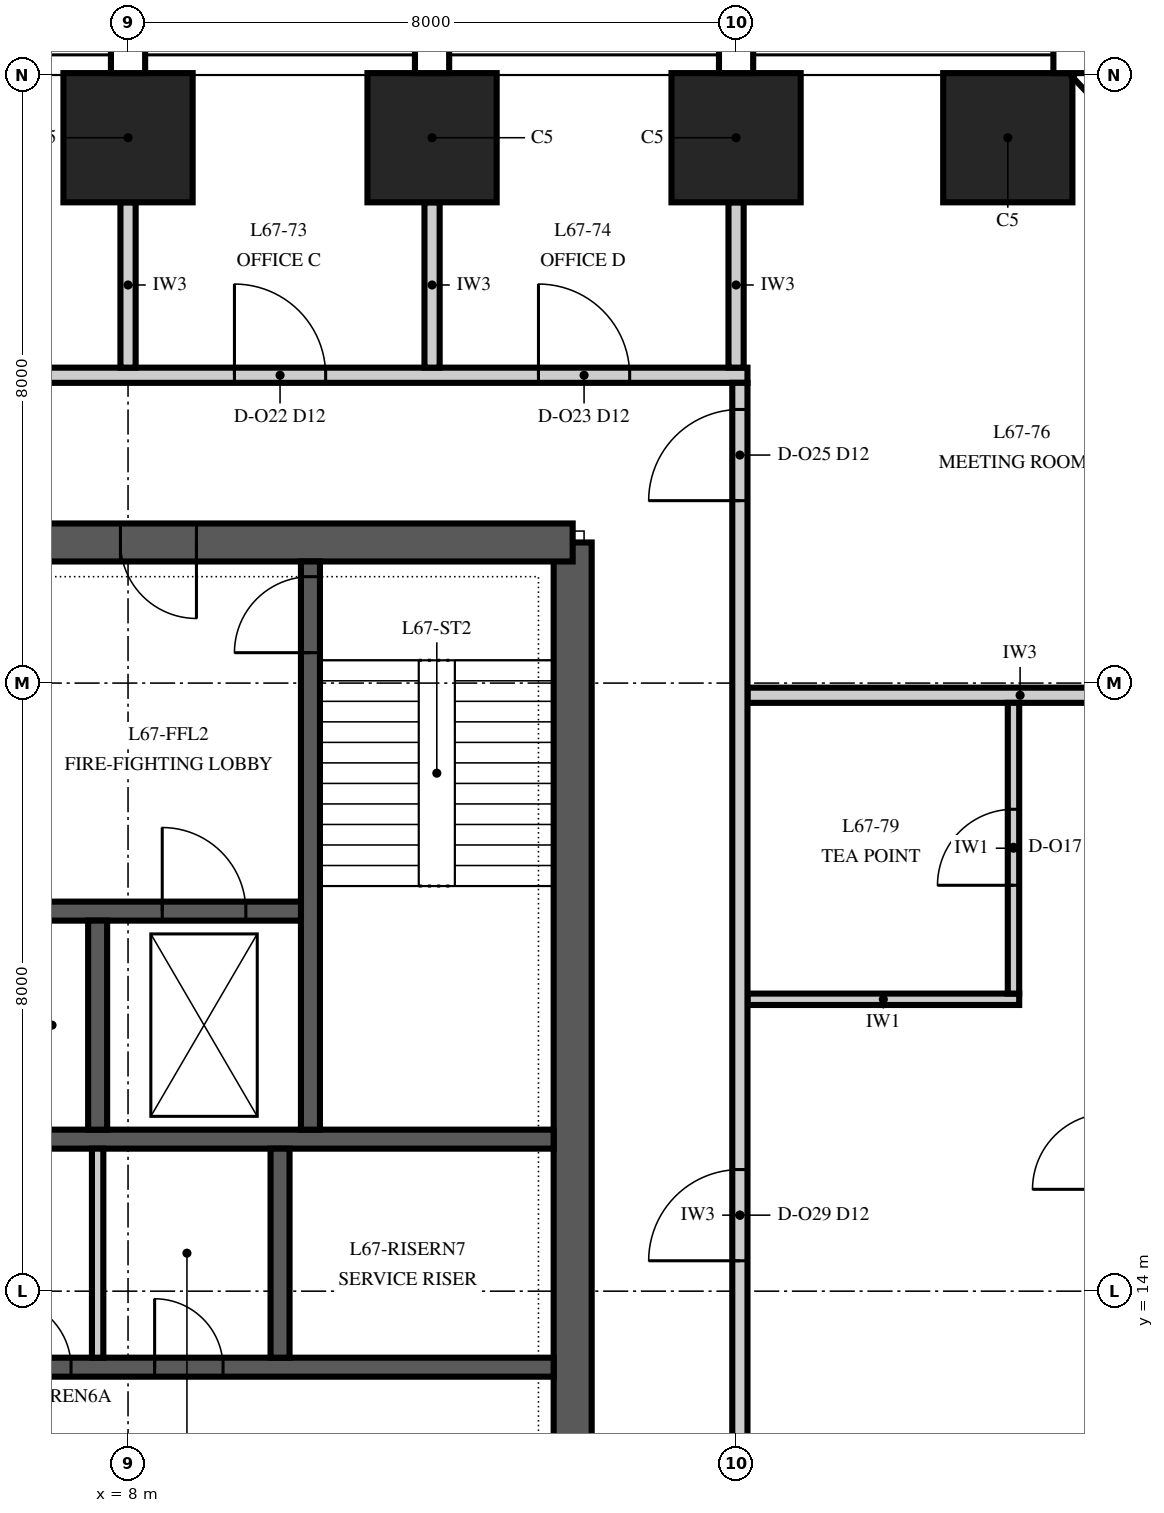
"""IFC4 building model, lengths in metres.
Left out: names, types, materials, properties, quantities, classifications, styles, units other than length and angle.
Written with IfcOpenShell. Run it as: python <this file> out.ifc"""

import sys

from ifc_helpers import new_model, si_unit, direction, frame, frame_2d, origin, origin_2d, place, context, subcontext, project, spatial, polyline, rectangle, outline, extrude, element, fill, save


model = new_model("IFC4")
c1 = context("Model", 3, precision=1e-05, world=origin(), true_north=direction((0.0, 1.0)))
c2 = subcontext(c1, "Body", "Model", "MODEL_VIEW")
j1 = project(units=[si_unit("LENGTHUNIT", "METRE"), si_unit("PLANEANGLEUNIT", "RADIAN")], contexts=[c1])
p1 = place(None, origin())
s1 = spatial("IfcSite", under=j1, at=p1, CompositionType="ELEMENT")
p2 = place(p1, origin())
s2 = spatial("IfcBuilding", under=s1, at=p2, CompositionType="ELEMENT")
p3 = place(p2, frame((0.0, 0.0, 288.0)))
s3 = spatial("IfcBuildingStorey", under=s2, at=p3, CompositionType="ELEMENT", Elevation=288.0)
for number, where, z_axis, x_axis in (
    (1, (19.575, 29.175, 0.0), (0.0, 0.0, 1.0), (-1.0, 0.0, 0.0)),
    (2, (16.0, 29.175, 0.0), (0.0, 0.0, 1.0), (-1.0, 0.0, 0.0)),
    (3, (12.0, 29.175, 0.0), (0.0, 0.0, 1.0), (-1.0, 0.0, 0.0)),
    (4, (8.0, 29.175, 0.0), (0.0, 0.0, 1.0), (-1.0, 0.0, 0.0)),
):
    element("IfcColumn", number, at=place(p3, frame(where, z_axis=z_axis, x_axis=x_axis)), inside=s3, PredefinedType="COLUMN", context=c2, shape_type="SweptSolid", body=[
        extrude(rectangle(XDim=1.7, YDim=1.7, at=origin_2d()), origin(), (0.0, 0.0, 1.0), 4.0),
    ])
p4 = place(p3, frame((13.85, 6.15, 0.0), z_axis=(0.0, 0.0, 1.0), x_axis=(0.0, 1.0, 0.0)))
e5 = element("IfcWall", 5, at=p4, inside=s3, PredefinedType="SHEAR", context=c2, shape_type="SweptSolid", body=[
    extrude(outline(polyline([(0.0, -0.25), (17.7, -0.25), (17.7, 0.0), (17.45, 0.0), (17.45, 0.25), (0.25, 0.25), (0.25, 0.0), (0.0, 0.0), (0.0, -0.25)])), origin(), (0.0, 0.0, 1.0), 4.0),
])
p5 = place(p4, frame((4.15, 0.0, 0.0)))
e6 = element("IfcOpeningElement", 6, at=p5, cuts=e5, PredefinedType="OPENING", context=c2, shape_type="SweptSolid", body=[
    extrude(rectangle(XDim=1.8, YDim=2.4, at=frame_2d((0.9, 1.2))), frame((0.0, 0.265, 0.0), z_axis=(0.0, -1.0, 0.0), x_axis=(1.0, 0.0, 0.0)), (0.0, 0.0, 1.0), 0.53),
])
p6 = place(p3, frame((13.85, 23.85, 0.0), z_axis=(0.0, 0.0, 1.0), x_axis=(-1.0, 0.0, 0.0)))
e7 = element("IfcWall", 7, at=p6, inside=s3, PredefinedType="SHEAR", context=c2, shape_type="SweptSolid", body=[
    extrude(rectangle(XDim=27.7, YDim=0.5, at=frame_2d((13.85, 0.0))), origin(), (0.0, 0.0, 1.0), 4.0),
])
p7 = place(p6, frame((21.75, 0.0, 0.0)))
e8 = element("IfcOpeningElement", 8, at=p7, cuts=e7, PredefinedType="OPENING", context=c2, shape_type="SweptSolid", body=[
    extrude(rectangle(XDim=1.0, YDim=2.1, at=frame_2d((0.5, 1.05))), frame((0.0, 0.265, 0.0), z_axis=(0.0, -1.0, 0.0), x_axis=(1.0, 0.0, 0.0)), (0.0, 0.0, 1.0), 0.53),
])
p8 = place(p6, frame((4.95, 0.0, 0.0)))
e9 = element("IfcOpeningElement", 9, at=p8, cuts=e7, PredefinedType="OPENING", context=c2, shape_type="SweptSolid", body=[
    extrude(rectangle(XDim=1.0, YDim=2.1, at=frame_2d((0.5, 1.05))), frame((0.0, 0.265, 0.0), z_axis=(0.0, -1.0, 0.0), x_axis=(1.0, 0.0, 0.0)), (0.0, 0.0, 1.0), 0.53),
])
p9 = place(p6, frame((17.35, 0.0, 0.0)))
e10 = element("IfcOpeningElement", 10, at=p9, cuts=e7, PredefinedType="OPENING", context=c2, shape_type="SweptSolid", body=[
    extrude(rectangle(XDim=1.0, YDim=2.1, at=frame_2d((0.5, 1.05))), frame((0.0, 0.265, 0.0), z_axis=(0.0, -1.0, 0.0), x_axis=(1.0, 0.0, 0.0)), (0.0, 0.0, 1.0), 0.53),
])
p10 = place(p6, frame((13.35, 0.0, 0.0)))
e11 = element("IfcOpeningElement", 11, at=p10, cuts=e7, PredefinedType="OPENING", context=c2, shape_type="SweptSolid", body=[
    extrude(rectangle(XDim=1.0, YDim=2.1, at=frame_2d((0.5, 1.05))), frame((0.0, 0.265, 0.0), z_axis=(0.0, -1.0, 0.0), x_axis=(1.0, 0.0, 0.0)), (0.0, 0.0, 1.0), 0.53),
])
p11 = place(p6, frame((9.35, 0.0, 0.0)))
e12 = element("IfcOpeningElement", 12, at=p11, cuts=e7, PredefinedType="OPENING", context=c2, shape_type="SweptSolid", body=[
    extrude(rectangle(XDim=1.0, YDim=2.1, at=frame_2d((0.5, 1.05))), frame((0.0, 0.265, 0.0), z_axis=(0.0, -1.0, 0.0), x_axis=(1.0, 0.0, 0.0)), (0.0, 0.0, 1.0), 0.53),
])
p12 = place(p3, frame((-13.6, 13.0, 0.0), z_axis=(0.0, 0.0, 1.0), x_axis=(1.0, 0.0, 0.0)))
e13 = element("IfcWall", 13, at=p12, inside=s3, PredefinedType="SHEAR", context=c2, shape_type="SweptSolid", body=[
    extrude(rectangle(XDim=27.2, YDim=0.25, at=frame_2d((13.6, 0.0))), origin(), (0.0, 0.0, 1.0), 4.0),
])
p13 = place(p12, frame((15.25, 0.0, 0.0)))
e14 = element("IfcOpeningElement", 14, at=p13, cuts=e13, PredefinedType="OPENING", context=c2, shape_type="SweptSolid", body=[
    extrude(rectangle(XDim=0.9, YDim=2.1, at=frame_2d((0.45, 1.05))), frame((0.0, 0.14, 0.0), z_axis=(0.0, -1.0, 0.0), x_axis=(1.0, 0.0, 0.0)), (0.0, 0.0, 1.0), 0.28),
])
p14 = place(p12, frame((17.65, 0.0, 0.0)))
e15 = element("IfcOpeningElement", 15, at=p14, cuts=e13, PredefinedType="OPENING", context=c2, shape_type="SweptSolid", body=[
    extrude(rectangle(XDim=0.9, YDim=2.1, at=frame_2d((0.45, 1.05))), frame((0.0, 0.14, 0.0), z_axis=(0.0, -1.0, 0.0), x_axis=(1.0, 0.0, 0.0)), (0.0, 0.0, 1.0), 0.28),
])
p15 = place(p12, frame((19.95, 0.0, 0.0)))
e16 = element("IfcOpeningElement", 16, at=p15, cuts=e13, PredefinedType="OPENING", context=c2, shape_type="SweptSolid", body=[
    extrude(rectangle(XDim=0.9, YDim=2.1, at=frame_2d((0.45, 1.05))), frame((0.0, 0.14, 0.0), z_axis=(0.0, -1.0, 0.0), x_axis=(1.0, 0.0, 0.0)), (0.0, 0.0, 1.0), 0.28),
])
p16 = place(p12, frame((21.95, 0.0, 0.0)))
e17 = element("IfcOpeningElement", 17, at=p16, cuts=e13, PredefinedType="OPENING", context=c2, shape_type="SweptSolid", body=[
    extrude(rectangle(XDim=0.9, YDim=2.1, at=frame_2d((0.45, 1.05))), frame((0.0, 0.14, 0.0), z_axis=(0.0, -1.0, 0.0), x_axis=(1.0, 0.0, 0.0)), (0.0, 0.0, 1.0), 0.28),
])
p17 = place(p12, frame((0.55, 0.0, 0.0)))
e18 = element("IfcOpeningElement", 18, at=p17, cuts=e13, PredefinedType="OPENING", context=c2, shape_type="SweptSolid", body=[
    extrude(rectangle(XDim=0.9, YDim=2.1, at=frame_2d((0.45, 1.05))), frame((0.0, 0.14, 0.0), z_axis=(0.0, -1.0, 0.0), x_axis=(1.0, 0.0, 0.0)), (0.0, 0.0, 1.0), 0.28),
])
p18 = place(p12, frame((3.35, 0.0, 0.0)))
e19 = element("IfcOpeningElement", 19, at=p18, cuts=e13, PredefinedType="OPENING", context=c2, shape_type="SweptSolid", body=[
    extrude(rectangle(XDim=0.9, YDim=2.1, at=frame_2d((0.45, 1.05))), frame((0.0, 0.14, 0.0), z_axis=(0.0, -1.0, 0.0), x_axis=(1.0, 0.0, 0.0)), (0.0, 0.0, 1.0), 0.28),
])
p19 = place(p12, frame((6.15, 0.0, 0.0)))
e20 = element("IfcOpeningElement", 20, at=p19, cuts=e13, PredefinedType="OPENING", context=c2, shape_type="SweptSolid", body=[
    extrude(rectangle(XDim=0.9, YDim=2.1, at=frame_2d((0.45, 1.05))), frame((0.0, 0.14, 0.0), z_axis=(0.0, -1.0, 0.0), x_axis=(1.0, 0.0, 0.0)), (0.0, 0.0, 1.0), 0.28),
])
p20 = place(p3, frame((-13.6, 16.0, 0.0), z_axis=(0.0, 0.0, 1.0), x_axis=(1.0, 0.0, 0.0)))
e21 = element("IfcWall", 21, at=p20, inside=s3, PredefinedType="SHEAR", context=c2, shape_type="SweptSolid", body=[
    extrude(rectangle(XDim=27.2, YDim=0.25, at=frame_2d((13.6, 0.0))), origin(), (0.0, 0.0, 1.0), 4.0),
])
p21 = place(p3, frame((10.0, 13.125, 0.0), z_axis=(0.0, 0.0, 1.0), x_axis=(0.0, 1.0, 0.0)))
e22 = element("IfcWall", 22, at=p21, inside=s3, PredefinedType="SHEAR", context=c2, shape_type="SweptSolid", body=[
    extrude(rectangle(XDim=2.75, YDim=0.25, at=frame_2d((1.375, 0.0))), origin(), (0.0, 0.0, 1.0), 4.0),
])
p22 = place(p3, frame((10.4, 16.125, 0.0), z_axis=(0.0, 0.0, 1.0), x_axis=(0.0, 1.0, 0.0)))
e23 = element("IfcWall", 23, at=p22, inside=s3, PredefinedType="SHEAR", context=c2, shape_type="SweptSolid", body=[
    extrude(rectangle(XDim=7.475, YDim=0.25, at=frame_2d((3.738, 0.0))), origin(), (0.0, 0.0, 1.0), 4.0),
])
p23 = place(p22, frame((6.275, 0.0, 0.0)))
e24 = element("IfcOpeningElement", 24, at=p23, cuts=e23, PredefinedType="OPENING", context=c2, shape_type="SweptSolid", body=[
    extrude(rectangle(XDim=1.0, YDim=2.1, at=frame_2d((0.5, 1.05))), frame((0.0, 0.14, 0.0), z_axis=(0.0, -1.0, 0.0), x_axis=(1.0, 0.0, 0.0)), (0.0, 0.0, 1.0), 0.28),
])
p24 = place(p3, frame((6.525, 19.0, 0.0), z_axis=(0.0, 0.0, 1.0), x_axis=(1.0, 0.0, 0.0)))
e25 = element("IfcWall", 25, at=p24, inside=s3, PredefinedType="SHEAR", context=c2, shape_type="SweptSolid", body=[
    extrude(rectangle(XDim=3.75, YDim=0.25, at=frame_2d((1.875, 0.0))), origin(), (0.0, 0.0, 1.0), 4.0),
])
p25 = place(p24, frame((1.925, 0.0, 0.0)))
e26 = element("IfcOpeningElement", 26, at=p25, cuts=e25, PredefinedType="OPENING", context=c2, shape_type="SweptSolid", body=[
    extrude(rectangle(XDim=1.1, YDim=2.1, at=frame_2d((0.55, 1.05))), frame((0.0, 0.14, 0.0), z_axis=(0.0, -1.0, 0.0), x_axis=(1.0, 0.0, 0.0)), (0.0, 0.0, 1.0), 0.28),
])
p26 = place(p3, frame((7.6, 16.125, 0.0), z_axis=(0.0, 0.0, 1.0), x_axis=(0.0, 1.0, 0.0)))
e27 = element("IfcWall", 27, at=p26, inside=s3, PredefinedType="SHEAR", context=c2, shape_type="SweptSolid", body=[
    extrude(rectangle(XDim=2.75, YDim=0.25, at=frame_2d((1.375, 0.0))), origin(), (0.0, 0.0, 1.0), 4.0),
])
p27 = place(p3, frame((7.6, 13.125, 0.0), z_axis=(0.0, 0.0, 1.0), x_axis=(0.0, 1.0, 0.0)))
e28 = element("IfcWall", 28, at=p27, inside=s3, PredefinedType="PARTITIONING", context=c2, shape_type="SweptSolid", body=[
    extrude(rectangle(XDim=2.75, YDim=0.15, at=frame_2d((1.375, 0.0))), origin(), (0.0, 0.0, 1.0), 3.85),
])
p28 = place(p3, frame((16.15, 17.84, 0.0), z_axis=(0.0, 0.0, 1.0), x_axis=(1.0, 0.0, 0.0)))
e29 = element("IfcWall", 29, at=p28, inside=s3, PredefinedType="PARTITIONING", context=c2, shape_type="SweptSolid", body=[
    extrude(rectangle(XDim=3.575, YDim=0.15, at=frame_2d((1.788, 0.0))), origin(), (0.0, 0.0, 1.0), 3.23),
])
p29 = place(p3, frame((16.15, 21.84, 0.0), z_axis=(0.0, 0.0, 1.0), x_axis=(1.0, 0.0, 0.0)))
e30 = element("IfcWall", 30, at=p29, inside=s3, PredefinedType="PARTITIONING", context=c2, shape_type="SweptSolid", body=[
    extrude(rectangle(XDim=7.174, YDim=0.2, at=frame_2d((3.587, 0.0))), origin(), (0.0, 0.0, 1.0), 3.23),
])
p30 = place(p3, frame((-16.15, 26.05, 0.0), z_axis=(0.0, 0.0, 1.0), x_axis=(1.0, 0.0, 0.0)))
e31 = element("IfcWall", 31, at=p30, inside=s3, PredefinedType="PARTITIONING", context=c2, shape_type="SweptSolid", body=[
    extrude(rectangle(XDim=32.3, YDim=0.2, at=frame_2d((16.15, 0.0))), origin(), (0.0, 0.0, 1.0), 3.418),
])
p31 = place(p30, frame((1.55, 0.0, 0.0)))
e32 = element("IfcOpeningElement", 32, at=p31, cuts=e31, PredefinedType="OPENING", context=c2, shape_type="SweptSolid", body=[
    extrude(rectangle(XDim=1.2, YDim=2.4, at=frame_2d((0.6, 1.2))), frame((0.0, 0.115, 0.0), z_axis=(0.0, -1.0, 0.0), x_axis=(1.0, 0.0, 0.0)), (0.0, 0.0, 1.0), 0.23),
])
p32 = place(p30, frame((5.55, 0.0, 0.0)))
e33 = element("IfcOpeningElement", 33, at=p32, cuts=e31, PredefinedType="OPENING", context=c2, shape_type="SweptSolid", body=[
    extrude(rectangle(XDim=1.2, YDim=2.4, at=frame_2d((0.6, 1.2))), frame((0.0, 0.115, 0.0), z_axis=(0.0, -1.0, 0.0), x_axis=(1.0, 0.0, 0.0)), (0.0, 0.0, 1.0), 0.23),
])
p33 = place(p30, frame((11.55, 0.0, 0.0)))
e34 = element("IfcOpeningElement", 34, at=p33, cuts=e31, PredefinedType="OPENING", context=c2, shape_type="SweptSolid", body=[
    extrude(rectangle(XDim=1.2, YDim=2.4, at=frame_2d((0.6, 1.2))), frame((0.0, 0.115, 0.0), z_axis=(0.0, -1.0, 0.0), x_axis=(1.0, 0.0, 0.0)), (0.0, 0.0, 1.0), 0.23),
])
p34 = place(p30, frame((19.55, 0.0, 0.0)))
e35 = element("IfcOpeningElement", 35, at=p34, cuts=e31, PredefinedType="OPENING", context=c2, shape_type="SweptSolid", body=[
    extrude(rectangle(XDim=1.2, YDim=2.4, at=frame_2d((0.6, 1.2))), frame((0.0, 0.115, 0.0), z_axis=(0.0, -1.0, 0.0), x_axis=(1.0, 0.0, 0.0)), (0.0, 0.0, 1.0), 0.23),
])
p35 = place(p30, frame((25.55, 0.0, 0.0)))
e36 = element("IfcOpeningElement", 36, at=p35, cuts=e31, PredefinedType="OPENING", context=c2, shape_type="SweptSolid", body=[
    extrude(rectangle(XDim=1.2, YDim=2.4, at=frame_2d((0.6, 1.2))), frame((0.0, 0.115, 0.0), z_axis=(0.0, -1.0, 0.0), x_axis=(1.0, 0.0, 0.0)), (0.0, 0.0, 1.0), 0.23),
])
p36 = place(p30, frame((29.55, 0.0, 0.0)))
e37 = element("IfcOpeningElement", 37, at=p36, cuts=e31, PredefinedType="OPENING", context=c2, shape_type="SweptSolid", body=[
    extrude(rectangle(XDim=1.2, YDim=2.4, at=frame_2d((0.6, 1.2))), frame((0.0, 0.115, 0.0), z_axis=(0.0, -1.0, 0.0), x_axis=(1.0, 0.0, 0.0)), (0.0, 0.0, 1.0), 0.23),
])
for number, where, z_axis, x_axis in (
    (38, (8.0, 26.15, 0.0), (0.0, 0.0, 1.0), (0.0, 1.0, 0.0)),
    (39, (12.0, 26.15, 0.0), (0.0, 0.0, 1.0), (0.0, 1.0, 0.0)),
    (40, (16.0, 26.15, 0.0), (0.0, 0.0, 1.0), (0.0, 1.0, 0.0)),
):
    element("IfcWall", number, at=place(p3, frame(where, z_axis=z_axis, x_axis=x_axis)), inside=s3, PredefinedType="PARTITIONING", context=c2, shape_type="SweptSolid", body=[
        extrude(rectangle(XDim=2.175, YDim=0.2, at=frame_2d((1.087, 0.0))), origin(), (0.0, 0.0, 1.0), 3.418),
    ])
p37 = place(p3, frame((16.05, 4.05, 0.0), z_axis=(0.0, 0.0, 1.0), x_axis=(0.0, 1.0, 0.0)))
e41 = element("IfcWall", 41, at=p37, inside=s3, PredefinedType="PARTITIONING", context=c2, shape_type="SweptSolid", body=[
    extrude(rectangle(XDim=21.9, YDim=0.2, at=frame_2d((10.95, 0.0))), origin(), (0.0, 0.0, 1.0), 2.842),
])
p38 = place(p37, frame((20.35, 0.0, 0.0)))
e42 = element("IfcOpeningElement", 42, at=p38, cuts=e41, PredefinedType="OPENING", context=c2, shape_type="SweptSolid", body=[
    extrude(rectangle(XDim=1.2, YDim=2.4, at=frame_2d((0.6, 1.2))), frame((0.0, 0.115, 0.0), z_axis=(0.0, -1.0, 0.0), x_axis=(1.0, 0.0, 0.0)), (0.0, 0.0, 1.0), 0.23),
])
p39 = place(p37, frame((10.35, 0.0, 0.0)))
e43 = element("IfcOpeningElement", 43, at=p39, cuts=e41, PredefinedType="OPENING", context=c2, shape_type="SweptSolid", body=[
    extrude(rectangle(XDim=1.2, YDim=2.4, at=frame_2d((0.6, 1.2))), frame((0.0, 0.115, 0.0), z_axis=(0.0, -1.0, 0.0), x_axis=(1.0, 0.0, 0.0)), (0.0, 0.0, 1.0), 0.23),
])
p40 = place(p3, frame((19.65, 17.915, 0.0), z_axis=(0.0, 0.0, 1.0), x_axis=(0.0, 1.0, 0.0)))
e44 = element("IfcWall", 44, at=p40, inside=s3, PredefinedType="PARTITIONING", context=c2, shape_type="SweptSolid", body=[
    extrude(rectangle(XDim=3.825, YDim=0.15, at=frame_2d((1.913, 0.0))), origin(), (0.0, 0.0, 1.0), 3.23),
])
p41 = place(p40, frame((1.425, 0.0, 0.0)))
e45 = element("IfcOpeningElement", 45, at=p41, cuts=e44, PredefinedType="OPENING", context=c2, shape_type="SweptSolid", body=[
    extrude(rectangle(XDim=1.0, YDim=2.3, at=frame_2d((0.5, 1.15))), frame((0.0, 0.09, 0.0), z_axis=(0.0, -1.0, 0.0), x_axis=(1.0, 0.0, 0.0)), (0.0, 0.0, 1.0), 0.18),
])
p42 = place(p8, origin())
e46 = element("IfcDoor", 46, at=p42, inside=s3, OperationType="SINGLE_SWING_RIGHT", PredefinedType="DOOR", context=c2, shape_type="SweptSolid", body=[
    extrude(rectangle(XDim=1.0, YDim=2.1, at=frame_2d((0.5, 1.05))), frame((0.0, 0.25, 0.0), z_axis=(0.0, -1.0, 0.0), x_axis=(1.0, 0.0, 0.0)), (0.0, 0.0, 1.0), 0.5),
])
fill(e9, e46)
p43 = place(p23, origin())
e47 = element("IfcDoor", 47, at=p43, inside=s3, OperationType="SINGLE_SWING_LEFT", PredefinedType="DOOR", context=c2, shape_type="SweptSolid", body=[
    extrude(rectangle(XDim=1.0, YDim=2.1, at=frame_2d((0.5, 1.05))), frame((0.0, 0.125, 0.0), z_axis=(0.0, -1.0, 0.0), x_axis=(1.0, 0.0, 0.0)), (0.0, 0.0, 1.0), 0.25),
])
fill(e24, e47)
p44 = place(p25, origin())
e48 = element("IfcDoor", 48, at=p44, inside=s3, OperationType="SLIDING_TO_RIGHT", PredefinedType="DOOR", context=c2, shape_type="SweptSolid", body=[
    extrude(rectangle(XDim=1.1, YDim=2.1, at=frame_2d((0.55, 1.05))), frame((0.0, 0.125, 0.0), z_axis=(0.0, -1.0, 0.0), x_axis=(1.0, 0.0, 0.0)), (0.0, 0.0, 1.0), 0.25),
])
fill(e26, e48)
p45 = place(p15, origin())
e49 = element("IfcDoor", 49, at=p45, inside=s3, OperationType="SINGLE_SWING_LEFT", PredefinedType="DOOR", context=c2, shape_type="SweptSolid", body=[
    extrude(rectangle(XDim=0.9, YDim=2.1, at=frame_2d((0.45, 1.05))), frame((0.0, 0.125, 0.0), z_axis=(0.0, -1.0, 0.0), x_axis=(1.0, 0.0, 0.0)), (0.0, 0.0, 1.0), 0.25),
])
fill(e16, e49)
p46 = place(p16, origin())
e50 = element("IfcDoor", 50, at=p46, inside=s3, OperationType="SINGLE_SWING_LEFT", PredefinedType="DOOR", context=c2, shape_type="SweptSolid", body=[
    extrude(rectangle(XDim=0.9, YDim=2.1, at=frame_2d((0.45, 1.05))), frame((0.0, 0.125, 0.0), z_axis=(0.0, -1.0, 0.0), x_axis=(1.0, 0.0, 0.0)), (0.0, 0.0, 1.0), 0.25),
])
fill(e17, e50)
p47 = place(p41, origin())
e51 = element("IfcDoor", 51, at=p47, inside=s3, OperationType="SINGLE_SWING_LEFT", PredefinedType="DOOR", context=c2, shape_type="SweptSolid", body=[
    extrude(rectangle(XDim=1.0, YDim=2.3, at=frame_2d((0.5, 1.15))), frame((0.0, 0.075, 0.0), z_axis=(0.0, -1.0, 0.0), x_axis=(1.0, 0.0, 0.0)), (0.0, 0.0, 1.0), 0.149),
])
fill(e45, e51)
p48 = place(p35, origin())
e52 = element("IfcDoor", 52, at=p48, inside=s3, OperationType="SINGLE_SWING_LEFT", PredefinedType="DOOR", context=c2, shape_type="SweptSolid", body=[
    extrude(rectangle(XDim=1.2, YDim=2.4, at=frame_2d((0.6, 1.2))), frame((0.0, 0.1, 0.0), z_axis=(0.0, -1.0, 0.0), x_axis=(1.0, 0.0, 0.0)), (0.0, 0.0, 1.0), 0.199),
])
fill(e36, e52)
p49 = place(p36, origin())
e53 = element("IfcDoor", 53, at=p49, inside=s3, OperationType="SINGLE_SWING_LEFT", PredefinedType="DOOR", context=c2, shape_type="SweptSolid", body=[
    extrude(rectangle(XDim=1.2, YDim=2.4, at=frame_2d((0.6, 1.2))), frame((0.0, 0.1, 0.0), z_axis=(0.0, -1.0, 0.0), x_axis=(1.0, 0.0, 0.0)), (0.0, 0.0, 1.0), 0.199),
])
fill(e37, e53)
p50 = place(p38, origin())
e54 = element("IfcDoor", 54, at=p50, inside=s3, OperationType="SINGLE_SWING_LEFT", PredefinedType="DOOR", context=c2, shape_type="SweptSolid", body=[
    extrude(rectangle(XDim=1.2, YDim=2.4, at=frame_2d((0.6, 1.2))), frame((0.0, 0.1, 0.0), z_axis=(0.0, -1.0, 0.0), x_axis=(1.0, 0.0, 0.0)), (0.0, 0.0, 1.0), 0.199),
])
fill(e42, e54)
p51 = place(p39, origin())
e55 = element("IfcDoor", 55, at=p51, inside=s3, OperationType="SINGLE_SWING_LEFT", PredefinedType="DOOR", context=c2, shape_type="SweptSolid", body=[
    extrude(rectangle(XDim=1.2, YDim=2.4, at=frame_2d((0.6, 1.2))), frame((0.0, 0.1, 0.0), z_axis=(0.0, -1.0, 0.0), x_axis=(1.0, 0.0, 0.0)), (0.0, 0.0, 1.0), 0.199),
])
fill(e43, e55)
save(model, sys.argv[1])
